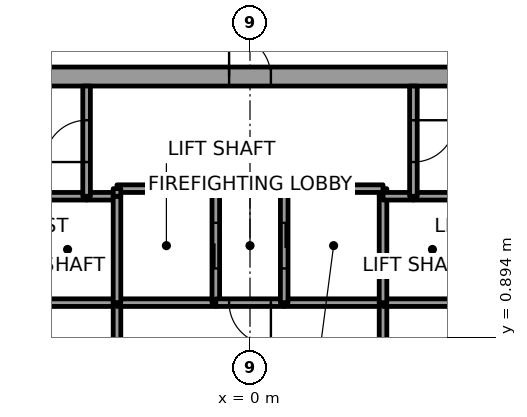
"""IFC4 building model, lengths in metres.
Left out: names, types, materials, properties, quantities, classifications, styles, units other than length and angle.
Written with IfcOpenShell. Run it as: python <this file> out.ifc"""

import sys

from ifc_helpers import new_model, si_unit, direction, frame, frame_2d, origin, place, context, subcontext, project, spatial, rectangle, extrude, element, fill, save


model = new_model("IFC4")
c1 = context("Model", 3, precision=1e-05, world=origin(), true_north=direction((0.0, 1.0)))
c2 = subcontext(c1, "Body", "Model", "MODEL_VIEW")
j1 = project(units=[si_unit("LENGTHUNIT", "METRE"), si_unit("PLANEANGLEUNIT", "RADIAN")], contexts=[c1])
p1 = place(None, origin())
s1 = spatial("IfcSite", under=j1, at=p1, CompositionType="ELEMENT")
p2 = place(p1, origin())
s2 = spatial("IfcBuilding", under=s1, at=p2, CompositionType="ELEMENT")
p3 = place(p2, frame((0.0, 0.0, 28.8)))
s3 = spatial("IfcBuildingStorey", under=s2, at=p3, CompositionType="ELEMENT", Elevation=28.8)
p4 = place(p3, frame((-11.0, 7.75, 0.0), z_axis=(0.0, 0.0, 1.0), x_axis=(1.0, 0.0, 0.0)))
e1 = element("IfcWall", 1, at=p4, inside=s3, PredefinedType="SHEAR", context=c2, shape_type="SweptSolid", body=[
    extrude(rectangle(XDim=22.0, YDim=0.5, at=frame_2d((11.0, 0.0))), origin(), (0.0, 0.0, 1.0), 5.4),
])
p5 = place(p4, frame((10.45, 0.0, 0.0)))
e2 = element("IfcOpeningElement", 2, at=p5, cuts=e1, PredefinedType="OPENING", context=c2, shape_type="SweptSolid", body=[
    extrude(rectangle(XDim=1.1, YDim=2.1, at=frame_2d((0.55, 1.05))), frame((0.0, 0.25, 0.0), z_axis=(0.0, -1.0, 0.0), x_axis=(1.0, 0.0, 0.0)), (0.0, 0.0, 1.0), 0.5),
])
p6 = place(p3, frame((-3.5, 1.8, 0.0), z_axis=(0.0, 0.0, 1.0), x_axis=(-1.0, 0.0, 0.0)))
e3 = element("IfcWall", 3, at=p6, inside=s3, PredefinedType="SOLIDWALL", context=c2, shape_type="SweptSolid", body=[
    extrude(rectangle(XDim=2.6, YDim=0.2, at=frame_2d((1.3, 0.0))), origin(), (0.0, 0.0, 1.0), 5.0),
])
p7 = place(p3, frame((-4.3, 4.6, 0.0), z_axis=(0.0, 0.0, 1.0), x_axis=(-1.0, 0.0, 0.0)))
e4 = element("IfcWall", 4, at=p7, inside=s3, PredefinedType="SOLIDWALL", context=c2, shape_type="SweptSolid", body=[
    extrude(rectangle(XDim=1.8, YDim=0.2, at=frame_2d((0.9, 0.0))), origin(), (0.0, 0.0, 1.0), 5.0),
])
p8 = place(p3, frame((-3.5, 4.6, 0.0), z_axis=(0.0, 0.0, 1.0), x_axis=(-1.0, 0.0, 0.0)))
e5 = element("IfcWall", 5, at=p8, inside=s3, PredefinedType="SOLIDWALL", context=c2, shape_type="SweptSolid", body=[
    extrude(rectangle(XDim=0.8, YDim=0.2, at=frame_2d((0.4, 0.0))), origin(), (0.0, 0.0, 1.0), 5.0),
])
p9 = place(p3, frame((-4.3, 4.6, 0.0), z_axis=(0.0, 0.0, 1.0), x_axis=(0.0, 1.0, 0.0)))
e6 = element("IfcWall", 6, at=p9, inside=s3, PredefinedType="SOLIDWALL", context=c2, shape_type="SweptSolid", body=[
    extrude(rectangle(XDim=2.9, YDim=0.2, at=frame_2d((1.45, 0.0))), origin(), (0.0, 0.0, 1.0), 5.0),
])
p10 = place(p9, frame((0.9, 0.0, 0.0)))
e7 = element("IfcOpeningElement", 7, at=p10, cuts=e6, PredefinedType="OPENING", context=c2, shape_type="SweptSolid", body=[
    extrude(rectangle(XDim=1.1, YDim=2.4, at=frame_2d((0.55, 1.2))), frame((0.0, 0.1, 0.0), z_axis=(0.0, -1.0, 0.0), x_axis=(1.0, 0.0, 0.0)), (0.0, 0.0, 1.0), 0.2),
])
p11 = place(p3, frame((-3.5, 1.8, 0.0), z_axis=(0.0, 0.0, 1.0), x_axis=(0.0, -1.0, 0.0)))
e8 = element("IfcWall", 8, at=p11, inside=s3, PredefinedType="SOLIDWALL", context=c2, shape_type="SweptSolid", body=[
    extrude(rectangle(XDim=3.6, YDim=0.2, at=frame_2d((1.8, 0.0))), origin(), (0.0, 0.0, 1.0), 5.0),
])
p12 = place(p11, frame((1.05, 0.0, 0.0)))
e9 = element("IfcOpeningElement", 9, at=p12, cuts=e8, PredefinedType="OPENING", context=c2, shape_type="SweptSolid", body=[
    extrude(rectangle(XDim=1.5, YDim=2.4, at=frame_2d((0.75, 1.2))), frame((0.0, 0.1, 0.0), z_axis=(0.0, -1.0, 0.0), x_axis=(1.0, 0.0, 0.0)), (0.0, 0.0, 1.0), 0.2),
])
p13 = place(p3, frame((-0.9, 1.8, 0.0), z_axis=(0.0, 0.0, 1.0), x_axis=(-1.0, 0.0, 0.0)))
e10 = element("IfcWall", 10, at=p13, inside=s3, PredefinedType="SOLIDWALL", context=c2, shape_type="SweptSolid", body=[
    extrude(rectangle(XDim=2.6, YDim=0.2, at=frame_2d((1.3, 0.0))), origin(), (0.0, 0.0, 1.0), 5.0),
])
p14 = place(p3, frame((-3.5, 4.6, 0.0), z_axis=(0.0, 0.0, 1.0), x_axis=(0.0, -1.0, 0.0)))
e11 = element("IfcWall", 11, at=p14, inside=s3, PredefinedType="SOLIDWALL", context=c2, shape_type="SweptSolid", body=[
    extrude(rectangle(XDim=2.8, YDim=0.2, at=frame_2d((1.4, 0.0))), origin(), (0.0, 0.0, 1.0), 5.0),
])
p15 = place(p3, frame((-0.9, 1.8, 0.0), z_axis=(0.0, 0.0, 1.0), x_axis=(0.0, 1.0, 0.0)))
e12 = element("IfcWall", 12, at=p15, inside=s3, PredefinedType="SOLIDWALL", context=c2, shape_type="SweptSolid", body=[
    extrude(rectangle(XDim=3.0, YDim=0.2, at=frame_2d((1.5, 0.0))), origin(), (0.0, 0.0, 1.0), 5.0),
])
p16 = place(p15, frame((0.9, 0.0, 0.0)))
e13 = element("IfcOpeningElement", 13, at=p16, cuts=e12, PredefinedType="OPENING", context=c2, shape_type="SweptSolid", body=[
    extrude(rectangle(XDim=1.2, YDim=2.1, at=frame_2d((0.6, 1.05))), frame((0.0, 0.1, 0.0), z_axis=(0.0, -1.0, 0.0), x_axis=(1.0, 0.0, 0.0)), (0.0, 0.0, 1.0), 0.2),
])
p17 = place(p3, frame((-0.9, 4.8, 0.0), z_axis=(0.0, 0.0, 1.0), x_axis=(-1.0, 0.0, 0.0)))
e14 = element("IfcWall", 14, at=p17, inside=s3, PredefinedType="SOLIDWALL", context=c2, shape_type="SweptSolid", body=[
    extrude(rectangle(XDim=2.6, YDim=0.2, at=frame_2d((1.3, 0.0))), origin(), (0.0, 0.0, 1.0), 5.0),
])
p18 = place(p3, frame((-3.5, 4.8, 0.0), z_axis=(0.0, 0.0, 1.0), x_axis=(0.0, -1.0, 0.0)))
e15 = element("IfcWall", 15, at=p18, inside=s3, PredefinedType="SOLIDWALL", context=c2, shape_type="SweptSolid", body=[
    extrude(rectangle(XDim=0.2, YDim=0.2, at=frame_2d((0.1, 0.0))), origin(), (0.0, 0.0, 1.0), 5.0),
])
p19 = place(p3, frame((0.9, 1.8, 0.0), z_axis=(0.0, 0.0, 1.0), x_axis=(-1.0, 0.0, 0.0)))
e16 = element("IfcWall", 16, at=p19, inside=s3, PredefinedType="SOLIDWALL", context=c2, shape_type="SweptSolid", body=[
    extrude(rectangle(XDim=1.8, YDim=0.2, at=frame_2d((0.9, 0.0))), origin(), (0.0, 0.0, 1.0), 5.0),
])
p20 = place(p19, frame((0.35, 0.0, 0.0)))
e17 = element("IfcOpeningElement", 17, at=p20, cuts=e16, PredefinedType="OPENING", context=c2, shape_type="SweptSolid", body=[
    extrude(rectangle(XDim=1.1, YDim=2.4, at=frame_2d((0.55, 1.2))), frame((0.0, 0.1, 0.0), z_axis=(0.0, -1.0, 0.0), x_axis=(1.0, 0.0, 0.0)), (0.0, 0.0, 1.0), 0.2),
])
p21 = place(p3, frame((3.5, 1.8, 0.0), z_axis=(0.0, 0.0, 1.0), x_axis=(-1.0, 0.0, 0.0)))
e18 = element("IfcWall", 18, at=p21, inside=s3, PredefinedType="SOLIDWALL", context=c2, shape_type="SweptSolid", body=[
    extrude(rectangle(XDim=2.6, YDim=0.2, at=frame_2d((1.3, 0.0))), origin(), (0.0, 0.0, 1.0), 5.0),
])
p22 = place(p3, frame((3.5, 4.6, 0.0), z_axis=(0.0, 0.0, 1.0), x_axis=(0.0, 1.0, 0.0)))
e19 = element("IfcWall", 19, at=p22, inside=s3, PredefinedType="SOLIDWALL", context=c2, shape_type="SweptSolid", body=[
    extrude(rectangle(XDim=0.2, YDim=0.2, at=frame_2d((0.1, 0.0))), origin(), (0.0, 0.0, 1.0), 5.0),
])
p23 = place(p3, frame((3.5, 4.8, 0.0), z_axis=(0.0, 0.0, 1.0), x_axis=(-1.0, 0.0, 0.0)))
e20 = element("IfcWall", 20, at=p23, inside=s3, PredefinedType="SOLIDWALL", context=c2, shape_type="SweptSolid", body=[
    extrude(rectangle(XDim=2.6, YDim=0.2, at=frame_2d((1.3, 0.0))), origin(), (0.0, 0.0, 1.0), 5.0),
])
p24 = place(p3, frame((0.9, 4.8, 0.0), z_axis=(0.0, 0.0, 1.0), x_axis=(0.0, -1.0, 0.0)))
e21 = element("IfcWall", 21, at=p24, inside=s3, PredefinedType="SOLIDWALL", context=c2, shape_type="SweptSolid", body=[
    extrude(rectangle(XDim=3.0, YDim=0.2, at=frame_2d((1.5, 0.0))), origin(), (0.0, 0.0, 1.0), 5.0),
])
p25 = place(p24, frame((0.9, 0.0, 0.0)))
e22 = element("IfcOpeningElement", 22, at=p25, cuts=e21, PredefinedType="OPENING", context=c2, shape_type="SweptSolid", body=[
    extrude(rectangle(XDim=1.2, YDim=2.1, at=frame_2d((0.6, 1.05))), frame((0.0, 0.1, 0.0), z_axis=(0.0, -1.0, 0.0), x_axis=(1.0, 0.0, 0.0)), (0.0, 0.0, 1.0), 0.2),
])
p26 = place(p3, frame((3.5, -1.8, 0.0), z_axis=(0.0, 0.0, 1.0), x_axis=(0.0, 1.0, 0.0)))
e23 = element("IfcWall", 23, at=p26, inside=s3, PredefinedType="SOLIDWALL", context=c2, shape_type="SweptSolid", body=[
    extrude(rectangle(XDim=3.6, YDim=0.2, at=frame_2d((1.8, 0.0))), origin(), (0.0, 0.0, 1.0), 5.0),
])
p27 = place(p26, frame((1.05, 0.0, 0.0)))
e24 = element("IfcOpeningElement", 24, at=p27, cuts=e23, PredefinedType="OPENING", context=c2, shape_type="SweptSolid", body=[
    extrude(rectangle(XDim=1.5, YDim=2.4, at=frame_2d((0.75, 1.2))), frame((0.0, 0.1, 0.0), z_axis=(0.0, -1.0, 0.0), x_axis=(1.0, 0.0, 0.0)), (0.0, 0.0, 1.0), 0.2),
])
p28 = place(p3, frame((6.1, 1.8, 0.0), z_axis=(0.0, 0.0, 1.0), x_axis=(-1.0, 0.0, 0.0)))
e25 = element("IfcWall", 25, at=p28, inside=s3, PredefinedType="SOLIDWALL", context=c2, shape_type="SweptSolid", body=[
    extrude(rectangle(XDim=2.6, YDim=0.2, at=frame_2d((1.3, 0.0))), origin(), (0.0, 0.0, 1.0), 5.0),
])
p29 = place(p3, frame((3.5, 1.8, 0.0), z_axis=(0.0, 0.0, 1.0), x_axis=(0.0, 1.0, 0.0)))
e26 = element("IfcWall", 26, at=p29, inside=s3, PredefinedType="SOLIDWALL", context=c2, shape_type="SweptSolid", body=[
    extrude(rectangle(XDim=2.8, YDim=0.2, at=frame_2d((1.4, 0.0))), origin(), (0.0, 0.0, 1.0), 5.0),
])
p30 = place(p3, frame((4.3, 4.6, 0.0), z_axis=(0.0, 0.0, 1.0), x_axis=(-1.0, 0.0, 0.0)))
e27 = element("IfcWall", 27, at=p30, inside=s3, PredefinedType="SOLIDWALL", context=c2, shape_type="SweptSolid", body=[
    extrude(rectangle(XDim=0.8, YDim=0.2, at=frame_2d((0.4, 0.0))), origin(), (0.0, 0.0, 1.0), 5.0),
])
p31 = place(p3, frame((6.1, 4.6, 0.0), z_axis=(0.0, 0.0, 1.0), x_axis=(-1.0, 0.0, 0.0)))
e28 = element("IfcWall", 28, at=p31, inside=s3, PredefinedType="SOLIDWALL", context=c2, shape_type="SweptSolid", body=[
    extrude(rectangle(XDim=1.8, YDim=0.2, at=frame_2d((0.9, 0.0))), origin(), (0.0, 0.0, 1.0), 5.0),
])
p32 = place(p3, frame((4.3, 7.5, 0.0), z_axis=(0.0, 0.0, 1.0), x_axis=(0.0, -1.0, 0.0)))
e29 = element("IfcWall", 29, at=p32, inside=s3, PredefinedType="SOLIDWALL", context=c2, shape_type="SweptSolid", body=[
    extrude(rectangle(XDim=2.9, YDim=0.2, at=frame_2d((1.45, 0.0))), origin(), (0.0, 0.0, 1.0), 5.0),
])
p33 = place(p32, frame((0.9, 0.0, 0.0)))
e30 = element("IfcOpeningElement", 30, at=p33, cuts=e29, PredefinedType="OPENING", context=c2, shape_type="SweptSolid", body=[
    extrude(rectangle(XDim=1.1, YDim=2.4, at=frame_2d((0.55, 1.2))), frame((0.0, 0.1, 0.0), z_axis=(0.0, -1.0, 0.0), x_axis=(1.0, 0.0, 0.0)), (0.0, 0.0, 1.0), 0.2),
])
p34 = place(p16, origin())
e31 = element("IfcDoor", 31, at=p34, inside=s3, OperationType="SLIDING_TO_RIGHT", PredefinedType="DOOR", context=c2, shape_type="SweptSolid", body=[
    extrude(rectangle(XDim=1.2, YDim=2.1, at=frame_2d((0.6, 1.05))), frame((0.0, 0.025, 0.0), z_axis=(0.0, -1.0, 0.0), x_axis=(1.0, 0.0, 0.0)), (0.0, 0.0, 1.0), 0.05),
])
fill(e13, e31)
p35 = place(p25, origin())
e32 = element("IfcDoor", 32, at=p35, inside=s3, OperationType="SLIDING_TO_RIGHT", PredefinedType="DOOR", context=c2, shape_type="SweptSolid", body=[
    extrude(rectangle(XDim=1.2, YDim=2.1, at=frame_2d((0.6, 1.05))), frame((0.0, 0.025, 0.0), z_axis=(0.0, -1.0, 0.0), x_axis=(1.0, 0.0, 0.0)), (0.0, 0.0, 1.0), 0.05),
])
fill(e22, e32)
p36 = place(p20, origin())
e33 = element("IfcDoor", 33, at=p36, inside=s3, OperationType="SINGLE_SWING_LEFT", PredefinedType="DOOR", context=c2, shape_type="SweptSolid", body=[
    extrude(rectangle(XDim=1.1, YDim=2.4, at=frame_2d((0.55, 1.2))), frame((0.0, 0.025, 0.0), z_axis=(0.0, -1.0, 0.0), x_axis=(1.0, 0.0, 0.0)), (0.0, 0.0, 1.0), 0.05),
])
fill(e17, e33)
p37 = place(p10, origin())
e34 = element("IfcDoor", 34, at=p37, inside=s3, OperationType="SINGLE_SWING_RIGHT", PredefinedType="DOOR", context=c2, shape_type="SweptSolid", body=[
    extrude(rectangle(XDim=1.1, YDim=2.4, at=frame_2d((0.55, 1.2))), frame((0.0, 0.025, 0.0), z_axis=(0.0, -1.0, 0.0), x_axis=(1.0, 0.0, 0.0)), (0.0, 0.0, 1.0), 0.05),
])
fill(e7, e34)
p38 = place(p33, origin())
e35 = element("IfcDoor", 35, at=p38, inside=s3, OperationType="SINGLE_SWING_RIGHT", PredefinedType="DOOR", context=c2, shape_type="SweptSolid", body=[
    extrude(rectangle(XDim=1.1, YDim=2.4, at=frame_2d((0.55, 1.2))), frame((0.0, 0.025, 0.0), z_axis=(0.0, -1.0, 0.0), x_axis=(1.0, 0.0, 0.0)), (0.0, 0.0, 1.0), 0.05),
])
fill(e30, e35)
p39 = place(p5, origin())
e36 = element("IfcDoor", 36, at=p39, inside=s3, OperationType="SINGLE_SWING_RIGHT", PredefinedType="DOOR", context=c2, shape_type="SweptSolid", body=[
    extrude(rectangle(XDim=1.1, YDim=2.1, at=frame_2d((0.55, 1.05))), frame((0.0, 0.025, 0.0), z_axis=(0.0, -1.0, 0.0), x_axis=(1.0, 0.0, 0.0)), (0.0, 0.0, 1.0), 0.05),
])
fill(e2, e36)
save(model, sys.argv[1])
